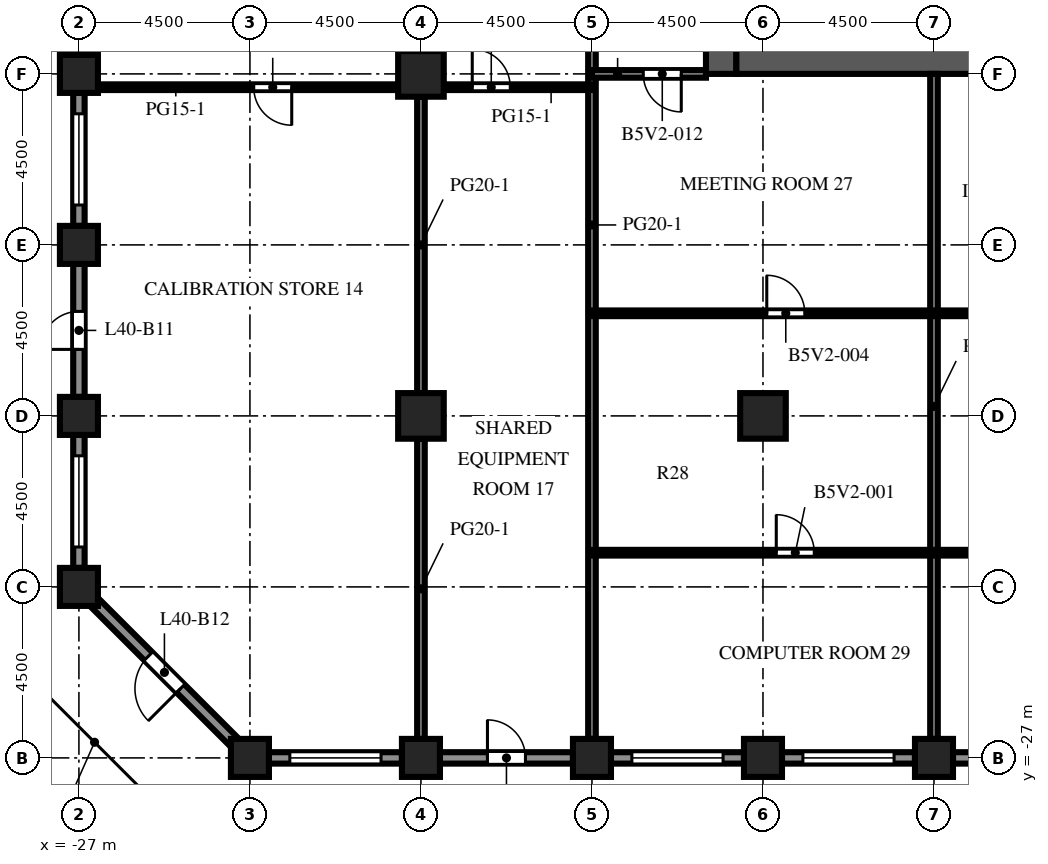
"""IFC4 building model, lengths in metres.
Left out: names, types, materials, properties, quantities, classifications, styles, units other than length and angle.
Written with IfcOpenShell. Run it as: python <this file> out.ifc"""

import sys

from ifc_helpers import new_model, si_unit, direction, frame, frame_2d, origin, origin_2d, place, context, subcontext, project, spatial, rectangle, extrude, element, fill, save


model = new_model("IFC4")
c1 = context("Model", 3, precision=1e-05, world=origin(), true_north=direction((0.0, 1.0)))
c2 = subcontext(c1, "Body", "Model", "MODEL_VIEW")
j1 = project(units=[si_unit("LENGTHUNIT", "METRE"), si_unit("PLANEANGLEUNIT", "RADIAN")], contexts=[c1])
p1 = place(None, origin())
s1 = spatial("IfcSite", under=j1, at=p1, CompositionType="ELEMENT")
p2 = place(p1, origin())
s2 = spatial("IfcBuilding", under=s1, at=p2, CompositionType="ELEMENT")
p3 = place(p2, frame((0.0, 0.0, 177.3)))
s3 = spatial("IfcBuildingStorey", under=s2, at=p3, CompositionType="ELEMENT", Elevation=177.3)
for number, where, z_axis, x_axis in (
    (1, (-27.0, -22.5, 0.0), (0.0, 0.0, 1.0), (1.0, 0.0, 0.0)),
    (2, (-27.0, -18.0, 0.0), (0.0, 0.0, 1.0), (1.0, 0.0, 0.0)),
    (3, (-27.0, -13.5, 0.0), (0.0, 0.0, 1.0), (1.0, 0.0, 0.0)),
    (4, (-27.0, -9.0, 0.0), (0.0, 0.0, 1.0), (1.0, 0.0, 0.0)),
    (5, (-22.5, -27.0, 0.0), (0.0, 0.0, 1.0), (1.0, 0.0, 0.0)),
    (6, (-18.0, -27.0, 0.0), (0.0, 0.0, 1.0), (1.0, 0.0, 0.0)),
    (7, (-13.5, -27.0, 0.0), (0.0, 0.0, 1.0), (1.0, 0.0, 0.0)),
    (8, (-9.0, -27.0, 0.0), (0.0, 0.0, 1.0), (1.0, 0.0, 0.0)),
    (9, (-4.5, -27.0, 0.0), (0.0, 0.0, 1.0), (1.0, 0.0, 0.0)),
):
    element("IfcColumn", number, at=place(p3, frame(where, z_axis=z_axis, x_axis=x_axis)), inside=s3, PredefinedType="COLUMN", context=c2, shape_type="SweptSolid", body=[
        extrude(rectangle(XDim=1.0, YDim=1.0, at=origin_2d()), origin(), (0.0, 0.0, 1.0), 4.1),
    ])
for number, where, z_axis, x_axis in (
    (10, (-18.0, -18.0, 0.0), (0.0, 0.0, 1.0), (1.0, 0.0, 0.0)),
    (11, (-18.0, -9.0, 0.0), (0.0, 0.0, 1.0), (1.0, 0.0, 0.0)),
    (12, (-9.0, -18.0, 0.0), (0.0, 0.0, 1.0), (1.0, 0.0, 0.0)),
):
    element("IfcColumn", number, at=place(p3, frame(where, z_axis=z_axis, x_axis=x_axis)), inside=s3, PredefinedType="COLUMN", context=c2, shape_type="SweptSolid", body=[
        extrude(rectangle(XDim=1.2, YDim=1.2, at=origin_2d()), origin(), (0.0, 0.0, 1.0), 4.1),
    ])
p4 = place(p3, frame((-10.1, -9.0, 0.0), z_axis=(0.0, 0.0, 1.0), x_axis=(0.0, 1.0, 0.0)))
e13 = element("IfcWall", 13, at=p4, inside=s3, PredefinedType="SHEAR", context=c2, shape_type="SweptSolid", body=[
    extrude(rectangle(XDim=27.5, YDim=0.8, at=frame_2d((13.75, 0.0))), origin(), (0.0, 0.0, 1.0), 4.1),
])
p5 = place(p4, frame((12.55, 0.0, 0.0)))
e14 = element("IfcOpeningElement", 14, at=p5, cuts=e13, PredefinedType="OPENING", context=c2, shape_type="SweptSolid", body=[
    extrude(rectangle(XDim=2.4, YDim=2.4, at=frame_2d((1.2, 1.2))), frame((0.0, 0.41, 0.0), z_axis=(0.0, -1.0, 0.0), x_axis=(1.0, 0.0, 0.0)), (0.0, 0.0, 1.0), 0.82),
])
p6 = place(p4, frame((6.825, 0.0, 0.0)))
e15 = element("IfcOpeningElement", 15, at=p6, cuts=e13, PredefinedType="OPENING", context=c2, shape_type="SweptSolid", body=[
    extrude(rectangle(XDim=1.2, YDim=2.1, at=frame_2d((0.6, 1.05))), frame((0.0, 0.41, 0.0), z_axis=(0.0, -1.0, 0.0), x_axis=(1.0, 0.0, 0.0)), (0.0, 0.0, 1.0), 0.82),
])
p7 = place(p4, frame((19.475, 0.0, 0.0)))
e16 = element("IfcOpeningElement", 16, at=p7, cuts=e13, PredefinedType="OPENING", context=c2, shape_type="SweptSolid", body=[
    extrude(rectangle(XDim=1.2, YDim=2.1, at=frame_2d((0.6, 1.05))), frame((0.0, 0.41, 0.0), z_axis=(0.0, -1.0, 0.0), x_axis=(1.0, 0.0, 0.0)), (0.0, 0.0, 1.0), 0.82),
])
p8 = place(p3, frame((-9.7, -8.6, 0.0), z_axis=(0.0, 0.0, 1.0), x_axis=(1.0, 0.0, 0.0)))
e17 = element("IfcWall", 17, at=p8, inside=s3, PredefinedType="SHEAR", context=c2, shape_type="SweptSolid", body=[
    extrude(rectangle(XDim=10.4, YDim=0.8, at=frame_2d((5.2, 0.0))), origin(), (0.0, 0.0, 1.0), 4.1),
])
p9 = place(p3, frame((-18.5, -27.0, 0.0), z_axis=(0.0, 0.0, 1.0), x_axis=(-1.0, 0.0, 0.0)))
e18 = element("IfcWall", 18, at=p9, inside=s3, PredefinedType="SOLIDWALL", context=c2, shape_type="SweptSolid", body=[
    extrude(rectangle(XDim=3.5, YDim=0.3, at=frame_2d((1.75, 0.0))), origin(), (0.0, 0.0, 1.0), 2.85),
])
p10 = place(p9, frame((0.55, 0.0, 0.8)))
e19 = element("IfcOpeningElement", 19, at=p10, cuts=e18, PredefinedType="OPENING", context=c2, shape_type="SweptSolid", body=[
    extrude(rectangle(XDim=2.4, YDim=1.7, at=frame_2d((1.2, 0.85))), frame((0.0, 0.16, 0.0), z_axis=(0.0, -1.0, 0.0), x_axis=(1.0, 0.0, 0.0)), (0.0, 0.0, 1.0), 0.32),
])
p11 = place(p3, frame((-14.0, -27.0, 0.0), z_axis=(0.0, 0.0, 1.0), x_axis=(-1.0, 0.0, 0.0)))
e20 = element("IfcWall", 20, at=p11, inside=s3, PredefinedType="SOLIDWALL", context=c2, shape_type="SweptSolid", body=[
    extrude(rectangle(XDim=3.5, YDim=0.3, at=frame_2d((1.75, 0.0))), origin(), (0.0, 0.0, 1.0), 2.85),
])
p12 = place(p11, frame((1.25, 0.0, 0.0)))
e21 = element("IfcOpeningElement", 21, at=p12, cuts=e20, PredefinedType="OPENING", context=c2, shape_type="SweptSolid", body=[
    extrude(rectangle(XDim=1.0, YDim=2.2, at=frame_2d((0.5, 1.1))), frame((0.0, 0.16, 0.0), z_axis=(0.0, -1.0, 0.0), x_axis=(1.0, 0.0, 0.0)), (0.0, 0.0, 1.0), 0.32),
])
p13 = place(p3, frame((-9.5, -27.0, 0.0), z_axis=(0.0, 0.0, 1.0), x_axis=(-1.0, 0.0, 0.0)))
e22 = element("IfcWall", 22, at=p13, inside=s3, PredefinedType="SOLIDWALL", context=c2, shape_type="SweptSolid", body=[
    extrude(rectangle(XDim=3.5, YDim=0.3, at=frame_2d((1.75, 0.0))), origin(), (0.0, 0.0, 1.0), 2.85),
])
p14 = place(p13, frame((0.55, 0.0, 0.8)))
e23 = element("IfcOpeningElement", 23, at=p14, cuts=e22, PredefinedType="OPENING", context=c2, shape_type="SweptSolid", body=[
    extrude(rectangle(XDim=2.4, YDim=1.7, at=frame_2d((1.2, 0.85))), frame((0.0, 0.16, 0.0), z_axis=(0.0, -1.0, 0.0), x_axis=(1.0, 0.0, 0.0)), (0.0, 0.0, 1.0), 0.32),
])
p15 = place(p3, frame((-5.0, -27.0, 0.0), z_axis=(0.0, 0.0, 1.0), x_axis=(-1.0, 0.0, 0.0)))
e24 = element("IfcWall", 24, at=p15, inside=s3, PredefinedType="SOLIDWALL", context=c2, shape_type="SweptSolid", body=[
    extrude(rectangle(XDim=3.5, YDim=0.3, at=frame_2d((1.75, 0.0))), origin(), (0.0, 0.0, 1.0), 2.85),
])
p16 = place(p15, frame((0.55, 0.0, 0.8)))
e25 = element("IfcOpeningElement", 25, at=p16, cuts=e24, PredefinedType="OPENING", context=c2, shape_type="SweptSolid", body=[
    extrude(rectangle(XDim=2.4, YDim=1.7, at=frame_2d((1.2, 0.85))), frame((0.0, 0.16, 0.0), z_axis=(0.0, -1.0, 0.0), x_axis=(1.0, 0.0, 0.0)), (0.0, 0.0, 1.0), 0.32),
])
p17 = place(p3, frame((-0.5, -27.0, 0.0), z_axis=(0.0, 0.0, 1.0), x_axis=(-1.0, 0.0, 0.0)))
e26 = element("IfcWall", 26, at=p17, inside=s3, PredefinedType="SOLIDWALL", context=c2, shape_type="SweptSolid", body=[
    extrude(rectangle(XDim=3.5, YDim=0.3, at=frame_2d((1.75, 0.0))), origin(), (0.0, 0.0, 1.0), 2.85),
])
p18 = place(p17, frame((0.55, 0.0, 0.8)))
e27 = element("IfcOpeningElement", 27, at=p18, cuts=e26, PredefinedType="OPENING", context=c2, shape_type="SweptSolid", body=[
    extrude(rectangle(XDim=2.4, YDim=1.7, at=frame_2d((1.2, 0.85))), frame((0.0, 0.16, 0.0), z_axis=(0.0, -1.0, 0.0), x_axis=(1.0, 0.0, 0.0)), (0.0, 0.0, 1.0), 0.32),
])
p19 = place(p3, frame((-27.0, -8.5, 0.0), z_axis=(0.0, 0.0, 1.0), x_axis=(0.0, 1.0, 0.0)))
e28 = element("IfcWall", 28, at=p19, inside=s3, PredefinedType="SOLIDWALL", context=c2, shape_type="SweptSolid", body=[
    extrude(rectangle(XDim=3.5, YDim=0.3, at=frame_2d((1.75, 0.0))), origin(), (0.0, 0.0, 1.0), 2.85),
])
p20 = place(p19, frame((0.55, 0.0, 0.8)))
e29 = element("IfcOpeningElement", 29, at=p20, cuts=e28, PredefinedType="OPENING", context=c2, shape_type="SweptSolid", body=[
    extrude(rectangle(XDim=2.4, YDim=1.7, at=frame_2d((1.2, 0.85))), frame((0.0, 0.16, 0.0), z_axis=(0.0, -1.0, 0.0), x_axis=(1.0, 0.0, 0.0)), (0.0, 0.0, 1.0), 0.32),
])
p21 = place(p3, frame((-27.0, -13.0, 0.0), z_axis=(0.0, 0.0, 1.0), x_axis=(0.0, 1.0, 0.0)))
e30 = element("IfcWall", 30, at=p21, inside=s3, PredefinedType="SOLIDWALL", context=c2, shape_type="SweptSolid", body=[
    extrude(rectangle(XDim=3.5, YDim=0.3, at=frame_2d((1.75, 0.0))), origin(), (0.0, 0.0, 1.0), 2.85),
])
p22 = place(p21, frame((0.55, 0.0, 0.8)))
e31 = element("IfcOpeningElement", 31, at=p22, cuts=e30, PredefinedType="OPENING", context=c2, shape_type="SweptSolid", body=[
    extrude(rectangle(XDim=2.4, YDim=1.7, at=frame_2d((1.2, 0.85))), frame((0.0, 0.16, 0.0), z_axis=(0.0, -1.0, 0.0), x_axis=(1.0, 0.0, 0.0)), (0.0, 0.0, 1.0), 0.32),
])
p23 = place(p3, frame((-27.0, -17.5, 0.0), z_axis=(0.0, 0.0, 1.0), x_axis=(0.0, 1.0, 0.0)))
e32 = element("IfcWall", 32, at=p23, inside=s3, PredefinedType="SOLIDWALL", context=c2, shape_type="SweptSolid", body=[
    extrude(rectangle(XDim=3.5, YDim=0.3, at=frame_2d((1.75, 0.0))), origin(), (0.0, 0.0, 1.0), 2.85),
])
p24 = place(p23, frame((1.25, 0.0, 0.0)))
e33 = element("IfcOpeningElement", 33, at=p24, cuts=e32, PredefinedType="OPENING", context=c2, shape_type="SweptSolid", body=[
    extrude(rectangle(XDim=1.0, YDim=2.2, at=frame_2d((0.5, 1.1))), frame((0.0, 0.16, 0.0), z_axis=(0.0, -1.0, 0.0), x_axis=(1.0, 0.0, 0.0)), (0.0, 0.0, 1.0), 0.32),
])
p25 = place(p3, frame((-27.0, -22.0, 0.0), z_axis=(0.0, 0.0, 1.0), x_axis=(0.0, 1.0, 0.0)))
e34 = element("IfcWall", 34, at=p25, inside=s3, PredefinedType="SOLIDWALL", context=c2, shape_type="SweptSolid", body=[
    extrude(rectangle(XDim=3.5, YDim=0.3, at=frame_2d((1.75, 0.0))), origin(), (0.0, 0.0, 1.0), 2.85),
])
p26 = place(p25, frame((0.55, 0.0, 0.8)))
e35 = element("IfcOpeningElement", 35, at=p26, cuts=e34, PredefinedType="OPENING", context=c2, shape_type="SweptSolid", body=[
    extrude(rectangle(XDim=2.4, YDim=1.7, at=frame_2d((1.2, 0.85))), frame((0.0, 0.16, 0.0), z_axis=(0.0, -1.0, 0.0), x_axis=(1.0, 0.0, 0.0)), (0.0, 0.0, 1.0), 0.32),
])
p27 = place(p3, frame((-22.894, -26.606, 0.0), z_axis=(0.0, 0.0, 1.0), x_axis=(-0.707106781187, 0.707106781187, 0.0)))
e36 = element("IfcWall", 36, at=p27, inside=s3, PredefinedType="SOLIDWALL", context=c2, shape_type="SweptSolid", body=[
    extrude(rectangle(XDim=5.25, YDim=0.3, at=frame_2d((2.625, 0.0))), origin(), (0.0, 0.0, 1.0), 2.85),
])
p28 = place(p27, frame((2.025, 0.0, 0.0)))
e37 = element("IfcOpeningElement", 37, at=p28, cuts=e36, PredefinedType="OPENING", context=c2, shape_type="SweptSolid", body=[
    extrude(rectangle(XDim=1.2, YDim=2.2, at=frame_2d((0.6, 1.1))), frame((0.0, 0.16, 0.0), z_axis=(0.0, -1.0, 0.0), x_axis=(1.0, 0.0, 0.0)), (0.0, 0.0, 1.0), 0.32),
])
p29 = place(p3, frame((-18.0, -26.5, 0.0), z_axis=(0.0, 0.0, 1.0), x_axis=(0.0, 1.0, 0.0)))
e38 = element("IfcWall", 38, at=p29, inside=s3, PredefinedType="PARTITIONING", context=c2, shape_type="SweptSolid", body=[
    extrude(rectangle(XDim=7.9, YDim=0.2, at=frame_2d((3.95, 0.0))), origin(), (0.0, 0.0, 1.0), 3.65),
])
p30 = place(p3, frame((-18.0, -17.4, 0.0), z_axis=(0.0, 0.0, 1.0), x_axis=(0.0, 1.0, 0.0)))
e39 = element("IfcWall", 39, at=p30, inside=s3, PredefinedType="PARTITIONING", context=c2, shape_type="SweptSolid", body=[
    extrude(rectangle(XDim=7.8, YDim=0.2, at=frame_2d((3.9, 0.0))), origin(), (0.0, 0.0, 1.0), 3.65),
])
p31 = place(p3, frame((-13.5, -26.5, 0.0), z_axis=(0.0, 0.0, 1.0), x_axis=(0.0, 1.0, 0.0)))
e40 = element("IfcWall", 40, at=p31, inside=s3, PredefinedType="PARTITIONING", context=c2, shape_type="SweptSolid", body=[
    extrude(rectangle(XDim=29.75, YDim=0.2, at=frame_2d((14.875, 0.0))), origin(), (0.0, 0.0, 1.0), 3.65),
])
p32 = place(p31, frame((27.05, 0.0, 0.0)))
e41 = element("IfcOpeningElement", 41, at=p32, cuts=e40, PredefinedType="OPENING", context=c2, shape_type="SweptSolid", body=[
    extrude(rectangle(XDim=1.0, YDim=2.1, at=frame_2d((0.5, 1.05))), frame((0.0, 0.11, 0.0), z_axis=(0.0, -1.0, 0.0), x_axis=(1.0, 0.0, 0.0)), (0.0, 0.0, 1.0), 0.22),
])
p33 = place(p3, frame((-4.5, -26.5, 0.0), z_axis=(0.0, 0.0, 1.0), x_axis=(0.0, 1.0, 0.0)))
e42 = element("IfcWall", 42, at=p33, inside=s3, PredefinedType="PARTITIONING", context=c2, shape_type="SweptSolid", body=[
    extrude(rectangle(XDim=17.5, YDim=0.2, at=frame_2d((8.75, 0.0))), origin(), (0.0, 0.0, 1.0), 3.65),
])
p34 = place(p3, frame((21.0, -21.6, 0.0), z_axis=(0.0, 0.0, 1.0), x_axis=(-1.0, 0.0, 0.0)))
e43 = element("IfcWall", 43, at=p34, inside=s3, PredefinedType="PARTITIONING", context=c2, shape_type="SweptSolid", body=[
    extrude(rectangle(XDim=34.5, YDim=0.15, at=frame_2d((17.25, 0.0))), origin(), (0.0, 0.0, 1.0), 3.65),
])
p35 = place(p34, frame((28.65, 0.0, 0.0)))
e44 = element("IfcOpeningElement", 44, at=p35, cuts=e43, PredefinedType="OPENING", context=c2, shape_type="SweptSolid", body=[
    extrude(rectangle(XDim=1.0, YDim=2.1, at=frame_2d((0.5, 1.05))), frame((0.0, 0.085, 0.0), z_axis=(0.0, -1.0, 0.0), x_axis=(1.0, 0.0, 0.0)), (0.0, 0.0, 1.0), 0.17),
])
p36 = place(p34, frame((16.4, 0.0, 0.0)))
e45 = element("IfcOpeningElement", 45, at=p36, cuts=e43, PredefinedType="OPENING", context=c2, shape_type="SweptSolid", body=[
    extrude(rectangle(XDim=1.0, YDim=2.1, at=frame_2d((0.5, 1.05))), frame((0.0, 0.085, 0.0), z_axis=(0.0, -1.0, 0.0), x_axis=(1.0, 0.0, 0.0)), (0.0, 0.0, 1.0), 0.17),
])
p37 = place(p34, frame((5.15, 0.0, 0.0)))
e46 = element("IfcOpeningElement", 46, at=p37, cuts=e43, PredefinedType="OPENING", context=c2, shape_type="SweptSolid", body=[
    extrude(rectangle(XDim=1.0, YDim=2.1, at=frame_2d((0.5, 1.05))), frame((0.0, 0.085, 0.0), z_axis=(0.0, -1.0, 0.0), x_axis=(1.0, 0.0, 0.0)), (0.0, 0.0, 1.0), 0.17),
])
p38 = place(p3, frame((21.0, -15.3, 0.0), z_axis=(0.0, 0.0, 1.0), x_axis=(-1.0, 0.0, 0.0)))
e47 = element("IfcWall", 47, at=p38, inside=s3, PredefinedType="PARTITIONING", context=c2, shape_type="SweptSolid", body=[
    extrude(rectangle(XDim=34.5, YDim=0.15, at=frame_2d((17.25, 0.0))), origin(), (0.0, 0.0, 1.0), 3.65),
])
p39 = place(p38, frame((28.9, 0.0, 0.0)))
e48 = element("IfcOpeningElement", 48, at=p39, cuts=e47, PredefinedType="OPENING", context=c2, shape_type="SweptSolid", body=[
    extrude(rectangle(XDim=1.0, YDim=2.1, at=frame_2d((0.5, 1.05))), frame((0.0, 0.085, 0.0), z_axis=(0.0, -1.0, 0.0), x_axis=(1.0, 0.0, 0.0)), (0.0, 0.0, 1.0), 0.17),
])
p40 = place(p38, frame((17.15, 0.0, 0.0)))
e49 = element("IfcOpeningElement", 49, at=p40, cuts=e47, PredefinedType="OPENING", context=c2, shape_type="SweptSolid", body=[
    extrude(rectangle(XDim=1.0, YDim=2.1, at=frame_2d((0.5, 1.05))), frame((0.0, 0.085, 0.0), z_axis=(0.0, -1.0, 0.0), x_axis=(1.0, 0.0, 0.0)), (0.0, 0.0, 1.0), 0.17),
])
p41 = place(p38, frame((7.15, 0.0, 0.0)))
e50 = element("IfcOpeningElement", 50, at=p41, cuts=e47, PredefinedType="OPENING", context=c2, shape_type="SweptSolid", body=[
    extrude(rectangle(XDim=1.0, YDim=2.1, at=frame_2d((0.5, 1.05))), frame((0.0, 0.085, 0.0), z_axis=(0.0, -1.0, 0.0), x_axis=(1.0, 0.0, 0.0)), (0.0, 0.0, 1.0), 0.17),
])
p42 = place(p3, frame((-18.6, -9.35, 0.0), z_axis=(0.0, 0.0, 1.0), x_axis=(-1.0, 0.0, 0.0)))
e51 = element("IfcWall", 51, at=p42, inside=s3, PredefinedType="PARTITIONING", context=c2, shape_type="SweptSolid", body=[
    extrude(rectangle(XDim=7.9, YDim=0.15, at=frame_2d((3.95, 0.0))), origin(), (0.0, 0.0, 1.0), 3.65),
])
p43 = place(p42, frame((2.8, 0.0, 0.0)))
e52 = element("IfcOpeningElement", 52, at=p43, cuts=e51, PredefinedType="OPENING", context=c2, shape_type="SweptSolid", body=[
    extrude(rectangle(XDim=1.0, YDim=2.1, at=frame_2d((0.5, 1.05))), frame((0.0, 0.085, 0.0), z_axis=(0.0, -1.0, 0.0), x_axis=(1.0, 0.0, 0.0)), (0.0, 0.0, 1.0), 0.17),
])
p44 = place(p3, frame((-13.5, -9.35, 0.0), z_axis=(0.0, 0.0, 1.0), x_axis=(-1.0, 0.0, 0.0)))
e53 = element("IfcWall", 53, at=p44, inside=s3, PredefinedType="PARTITIONING", context=c2, shape_type="SweptSolid", body=[
    extrude(rectangle(XDim=3.9, YDim=0.15, at=frame_2d((1.95, 0.0))), origin(), (0.0, 0.0, 1.0), 3.65),
])
p45 = place(p44, frame((2.15, 0.0, 0.0)))
e54 = element("IfcOpeningElement", 54, at=p45, cuts=e53, PredefinedType="OPENING", context=c2, shape_type="SweptSolid", body=[
    extrude(rectangle(XDim=1.0, YDim=2.1, at=frame_2d((0.5, 1.05))), frame((0.0, 0.085, 0.0), z_axis=(0.0, -1.0, 0.0), x_axis=(1.0, 0.0, 0.0)), (0.0, 0.0, 1.0), 0.17),
])
p46 = place(p3, frame((-10.5, -9.0, 0.0), z_axis=(0.0, 0.0, 1.0), x_axis=(-1.0, 0.0, 0.0)))
e55 = element("IfcWall", 55, at=p46, inside=s3, PredefinedType="PARTITIONING", context=c2, shape_type="SweptSolid", body=[
    extrude(rectangle(XDim=3.0, YDim=0.2, at=frame_2d((1.5, 0.0))), origin(), (0.0, 0.0, 1.0), 3.65),
])
p47 = place(p46, frame((0.65, 0.0, 0.0)))
e56 = element("IfcOpeningElement", 56, at=p47, cuts=e55, PredefinedType="OPENING", context=c2, shape_type="SweptSolid", body=[
    extrude(rectangle(XDim=1.0, YDim=2.1, at=frame_2d((0.5, 1.05))), frame((0.0, 0.11, 0.0), z_axis=(0.0, -1.0, 0.0), x_axis=(1.0, 0.0, 0.0)), (0.0, 0.0, 1.0), 0.22),
])
p48 = place(p10, origin())
e57 = element("IfcWindow", 57, at=p48, inside=s3, PartitioningType="SINGLE_PANEL", PredefinedType="WINDOW", context=c2, shape_type="SweptSolid", body=[
    extrude(rectangle(XDim=2.4, YDim=1.7, at=frame_2d((1.2, 0.85))), frame((0.0, 0.03, 0.0), z_axis=(0.0, -1.0, 0.0), x_axis=(1.0, 0.0, 0.0)), (0.0, 0.0, 1.0), 0.06),
])
fill(e19, e57)
p49 = place(p12, origin())
e58 = element("IfcDoor", 58, at=p49, inside=s3, OperationType="SINGLE_SWING_RIGHT", PredefinedType="DOOR", context=c2, shape_type="SweptSolid", body=[
    extrude(rectangle(XDim=1.0, YDim=2.2, at=frame_2d((0.5, 1.1))), frame((0.0, 0.025, 0.0), z_axis=(0.0, -1.0, 0.0), x_axis=(1.0, 0.0, 0.0)), (0.0, 0.0, 1.0), 0.05),
])
fill(e21, e58)
p50 = place(p14, origin())
e59 = element("IfcWindow", 59, at=p50, inside=s3, PartitioningType="SINGLE_PANEL", PredefinedType="WINDOW", context=c2, shape_type="SweptSolid", body=[
    extrude(rectangle(XDim=2.4, YDim=1.7, at=frame_2d((1.2, 0.85))), frame((0.0, 0.03, 0.0), z_axis=(0.0, -1.0, 0.0), x_axis=(1.0, 0.0, 0.0)), (0.0, 0.0, 1.0), 0.06),
])
fill(e23, e59)
p51 = place(p16, origin())
e60 = element("IfcWindow", 60, at=p51, inside=s3, PartitioningType="SINGLE_PANEL", PredefinedType="WINDOW", context=c2, shape_type="SweptSolid", body=[
    extrude(rectangle(XDim=2.4, YDim=1.7, at=frame_2d((1.2, 0.85))), frame((0.0, 0.03, 0.0), z_axis=(0.0, -1.0, 0.0), x_axis=(1.0, 0.0, 0.0)), (0.0, 0.0, 1.0), 0.06),
])
fill(e25, e60)
p52 = place(p22, origin())
e61 = element("IfcWindow", 61, at=p52, inside=s3, PartitioningType="SINGLE_PANEL", PredefinedType="WINDOW", context=c2, shape_type="SweptSolid", body=[
    extrude(rectangle(XDim=2.4, YDim=1.7, at=frame_2d((1.2, 0.85))), frame((0.0, 0.03, 0.0), z_axis=(0.0, -1.0, 0.0), x_axis=(1.0, 0.0, 0.0)), (0.0, 0.0, 1.0), 0.06),
])
fill(e31, e61)
p53 = place(p24, origin())
e62 = element("IfcDoor", 62, at=p53, inside=s3, OperationType="SINGLE_SWING_LEFT", PredefinedType="DOOR", context=c2, shape_type="SweptSolid", body=[
    extrude(rectangle(XDim=1.0, YDim=2.2, at=frame_2d((0.5, 1.1))), frame((0.0, 0.025, 0.0), z_axis=(0.0, -1.0, 0.0), x_axis=(1.0, 0.0, 0.0)), (0.0, 0.0, 1.0), 0.05),
])
fill(e33, e62)
p54 = place(p26, origin())
e63 = element("IfcWindow", 63, at=p54, inside=s3, PartitioningType="SINGLE_PANEL", PredefinedType="WINDOW", context=c2, shape_type="SweptSolid", body=[
    extrude(rectangle(XDim=2.4, YDim=1.7, at=frame_2d((1.2, 0.85))), frame((0.0, 0.03, 0.0), z_axis=(0.0, -1.0, 0.0), x_axis=(1.0, 0.0, 0.0)), (0.0, 0.0, 1.0), 0.06),
])
fill(e35, e63)
p55 = place(p28, origin())
e64 = element("IfcDoor", 64, at=p55, inside=s3, OperationType="SINGLE_SWING_LEFT", PredefinedType="DOOR", context=c2, shape_type="SweptSolid", body=[
    extrude(rectangle(XDim=1.2, YDim=2.2, at=frame_2d((0.6, 1.1))), frame((0.0, 0.025, 0.0), z_axis=(0.0, -1.0, 0.0), x_axis=(1.0, 0.0, 0.0)), (0.0, 0.0, 1.0), 0.05),
])
fill(e37, e64)
p56 = place(p35, origin())
e65 = element("IfcDoor", 65, at=p56, inside=s3, OperationType="SINGLE_SWING_RIGHT", PredefinedType="DOOR", context=c2, shape_type="SweptSolid", body=[
    extrude(rectangle(XDim=1.0, YDim=2.1, at=frame_2d((0.5, 1.05))), frame((0.0, 0.025, 0.0), z_axis=(0.0, -1.0, 0.0), x_axis=(1.0, 0.0, 0.0)), (0.0, 0.0, 1.0), 0.05),
])
fill(e44, e65)
p57 = place(p39, origin())
e66 = element("IfcDoor", 66, at=p57, inside=s3, OperationType="SINGLE_SWING_RIGHT", PredefinedType="DOOR", context=c2, shape_type="SweptSolid", body=[
    extrude(rectangle(XDim=1.0, YDim=2.1, at=frame_2d((0.5, 1.05))), frame((0.0, 0.025, 0.0), z_axis=(0.0, -1.0, 0.0), x_axis=(1.0, 0.0, 0.0)), (0.0, 0.0, 1.0), 0.05),
])
fill(e48, e66)
p58 = place(p43, origin())
e67 = element("IfcDoor", 67, at=p58, inside=s3, OperationType="SINGLE_SWING_LEFT", PredefinedType="DOOR", context=c2, shape_type="SweptSolid", body=[
    extrude(rectangle(XDim=1.0, YDim=2.1, at=frame_2d((0.5, 1.05))), frame((0.0, 0.025, 0.0), z_axis=(0.0, -1.0, 0.0), x_axis=(1.0, 0.0, 0.0)), (0.0, 0.0, 1.0), 0.05),
])
fill(e52, e67)
p59 = place(p45, origin())
e68 = element("IfcDoor", 68, at=p59, inside=s3, OperationType="SINGLE_SWING_RIGHT", PredefinedType="DOOR", context=c2, shape_type="SweptSolid", body=[
    extrude(rectangle(XDim=1.0, YDim=2.1, at=frame_2d((0.5, 1.05))), frame((0.0, 0.025, 0.0), z_axis=(0.0, -1.0, 0.0), x_axis=(1.0, 0.0, 0.0)), (0.0, 0.0, 1.0), 0.05),
])
fill(e54, e68)
p60 = place(p47, origin())
e69 = element("IfcDoor", 69, at=p60, inside=s3, OperationType="SINGLE_SWING_LEFT", PredefinedType="DOOR", context=c2, shape_type="SweptSolid", body=[
    extrude(rectangle(XDim=1.0, YDim=2.1, at=frame_2d((0.5, 1.05))), frame((0.0, 0.025, 0.0), z_axis=(0.0, -1.0, 0.0), x_axis=(1.0, 0.0, 0.0)), (0.0, 0.0, 1.0), 0.05),
])
fill(e56, e69)
save(model, sys.argv[1])
